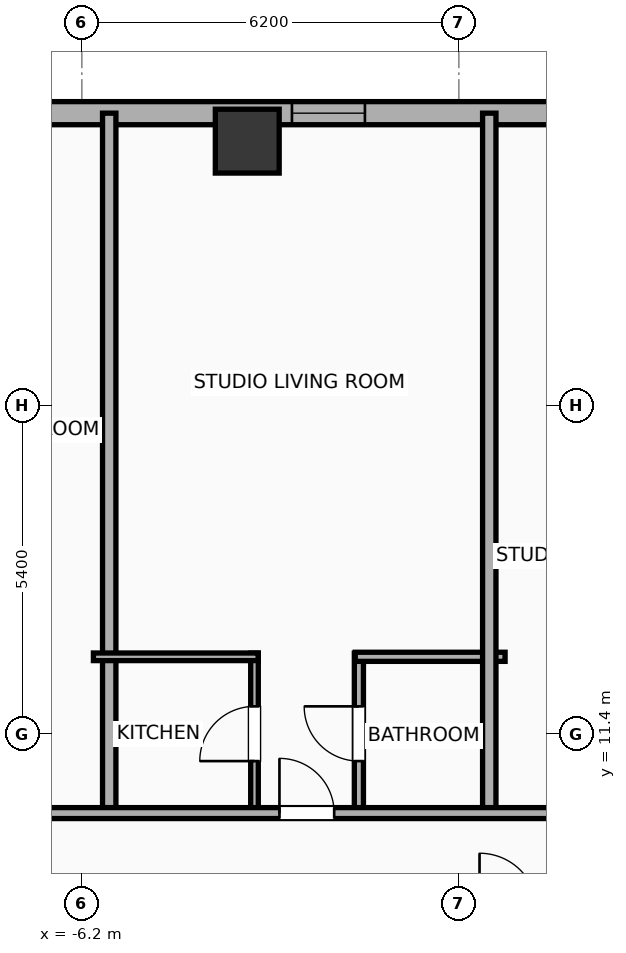
"""IFC4 building model, lengths in metres.
Left out: names, types, materials, properties, quantities, classifications, styles, units other than length and angle.
Written with IfcOpenShell. Run it as: python <this file> out.ifc"""

import sys

from ifc_helpers import new_model, si_unit, direction, frame, frame_2d, origin, origin_2d, place, context, subcontext, project, spatial, rectangle, hollow_rectangle, extrude, element, fill, save


model = new_model("IFC4")
c1 = context("Model", 3, precision=1e-05, world=origin(), true_north=direction((0.0, 1.0)))
c2 = subcontext(c1, "Body", "Model", "MODEL_VIEW")
j1 = project(units=[si_unit("LENGTHUNIT", "METRE"), si_unit("PLANEANGLEUNIT", "RADIAN")], contexts=[c1])
p1 = place(None, origin())
s1 = spatial("IfcSite", under=j1, at=p1, CompositionType="ELEMENT")
p2 = place(p1, origin())
s2 = spatial("IfcBuilding", under=s1, at=p2, CompositionType="ELEMENT")
p3 = place(p2, frame((0.0, 0.0, 124.8)))
s3 = spatial("IfcBuildingStorey", under=s2, at=p3, CompositionType="ELEMENT", Elevation=124.8)
p4 = place(p3, frame((-3.48, 21.15, 0.0), z_axis=(0.0, 0.0, 1.0), x_axis=(1.0, 0.0, 0.0)))
e1 = element("IfcColumn", 1, at=p4, inside=s3, PredefinedType="COLUMN", context=c2, shape_type="SweptSolid", body=[
    extrude(hollow_rectangle(XDim=1.05, YDim=1.05, WallThickness=0.036, at=origin_2d()), origin(), (0.0, 0.0, 1.0), 3.9),
])
p5 = place(p3, frame((-25.381, 21.61, 0.0), z_axis=(0.0, 0.0, 1.0), x_axis=(1.0, 0.0, 0.0)))
e2 = element("IfcWall", 2, at=p5, inside=s3, PredefinedType="ELEMENTEDWALL", context=c2, shape_type="SweptSolid", body=[
    extrude(rectangle(XDim=54.763, YDim=0.38, at=frame_2d((27.381, 0.0))), origin(), (0.0, 0.0, 1.0), 3.65),
])
p6 = place(p5, frame((4.795, 0.0, 0.75)))
e3 = element("IfcOpeningElement", 3, at=p6, cuts=e2, PredefinedType="OPENING", context=c2, shape_type="SweptSolid", body=[
    extrude(rectangle(XDim=2.4, YDim=2.1, at=frame_2d((1.2, 1.05))), frame((0.0, 0.2, 0.0), z_axis=(0.0, -1.0, 0.0), x_axis=(1.0, 0.0, 0.0)), (0.0, 0.0, 1.0), 0.4),
])
p7 = place(p5, frame((45.867, 0.0, 0.75)))
e4 = element("IfcOpeningElement", 4, at=p7, cuts=e2, PredefinedType="OPENING", context=c2, shape_type="SweptSolid", body=[
    extrude(rectangle(XDim=2.4, YDim=2.1, at=frame_2d((1.2, 1.05))), frame((0.0, 0.2, 0.0), z_axis=(0.0, -1.0, 0.0), x_axis=(1.0, 0.0, 0.0)), (0.0, 0.0, 1.0), 0.4),
])
p8 = place(p5, frame((2.408, 0.0, 0.75)))
e5 = element("IfcOpeningElement", 5, at=p8, cuts=e2, PredefinedType="OPENING", context=c2, shape_type="SweptSolid", body=[
    extrude(rectangle(XDim=1.2, YDim=2.05, at=frame_2d((0.6, 1.025))), frame((0.0, 0.2, 0.0), z_axis=(0.0, -1.0, 0.0), x_axis=(1.0, 0.0, 0.0)), (0.0, 0.0, 1.0), 0.4),
])
p9 = place(p5, frame((8.952, 0.0, 0.75)))
e6 = element("IfcOpeningElement", 6, at=p9, cuts=e2, PredefinedType="OPENING", context=c2, shape_type="SweptSolid", body=[
    extrude(rectangle(XDim=1.2, YDim=2.05, at=frame_2d((0.6, 1.025))), frame((0.0, 0.2, 0.0), z_axis=(0.0, -1.0, 0.0), x_axis=(1.0, 0.0, 0.0)), (0.0, 0.0, 1.0), 0.4),
])
p10 = place(p5, frame((17.132, 0.0, 0.75)))
e7 = element("IfcOpeningElement", 7, at=p10, cuts=e2, PredefinedType="OPENING", context=c2, shape_type="SweptSolid", body=[
    extrude(rectangle(XDim=1.2, YDim=2.05, at=frame_2d((0.6, 1.025))), frame((0.0, 0.2, 0.0), z_axis=(0.0, -1.0, 0.0), x_axis=(1.0, 0.0, 0.0)), (0.0, 0.0, 1.0), 0.4),
])
p11 = place(p5, frame((14.007, 0.0, 0.75)))
e8 = element("IfcOpeningElement", 8, at=p11, cuts=e2, PredefinedType="OPENING", context=c2, shape_type="SweptSolid", body=[
    extrude(rectangle(XDim=1.2, YDim=2.05, at=frame_2d((0.6, 1.025))), frame((0.0, 0.2, 0.0), z_axis=(0.0, -1.0, 0.0), x_axis=(1.0, 0.0, 0.0)), (0.0, 0.0, 1.0), 0.4),
])
p12 = place(p5, frame((22.636, 0.0, 0.75)))
e9 = element("IfcOpeningElement", 9, at=p12, cuts=e2, PredefinedType="OPENING", context=c2, shape_type="SweptSolid", body=[
    extrude(rectangle(XDim=1.2, YDim=2.05, at=frame_2d((0.6, 1.025))), frame((0.0, 0.2, 0.0), z_axis=(0.0, -1.0, 0.0), x_axis=(1.0, 0.0, 0.0)), (0.0, 0.0, 1.0), 0.4),
])
p13 = place(p5, frame((27.129, 0.0, 0.75)))
e10 = element("IfcOpeningElement", 10, at=p13, cuts=e2, PredefinedType="OPENING", context=c2, shape_type="SweptSolid", body=[
    extrude(rectangle(XDim=1.2, YDim=2.05, at=frame_2d((0.6, 1.025))), frame((0.0, 0.2, 0.0), z_axis=(0.0, -1.0, 0.0), x_axis=(1.0, 0.0, 0.0)), (0.0, 0.0, 1.0), 0.4),
])
p14 = place(p5, frame((30.254, 0.0, 0.75)))
e11 = element("IfcOpeningElement", 11, at=p14, cuts=e2, PredefinedType="OPENING", context=c2, shape_type="SweptSolid", body=[
    extrude(rectangle(XDim=1.2, YDim=2.05, at=frame_2d((0.6, 1.025))), frame((0.0, 0.2, 0.0), z_axis=(0.0, -1.0, 0.0), x_axis=(1.0, 0.0, 0.0)), (0.0, 0.0, 1.0), 0.4),
])
p15 = place(p5, frame((33.603, 0.0, 0.75)))
e12 = element("IfcOpeningElement", 12, at=p15, cuts=e2, PredefinedType="OPENING", context=c2, shape_type="SweptSolid", body=[
    extrude(rectangle(XDim=1.2, YDim=2.05, at=frame_2d((0.6, 1.025))), frame((0.0, 0.2, 0.0), z_axis=(0.0, -1.0, 0.0), x_axis=(1.0, 0.0, 0.0)), (0.0, 0.0, 1.0), 0.4),
])
p16 = place(p5, frame((36.608, 0.0, 0.75)))
e13 = element("IfcOpeningElement", 13, at=p16, cuts=e2, PredefinedType="OPENING", context=c2, shape_type="SweptSolid", body=[
    extrude(rectangle(XDim=1.2, YDim=2.05, at=frame_2d((0.6, 1.025))), frame((0.0, 0.2, 0.0), z_axis=(0.0, -1.0, 0.0), x_axis=(1.0, 0.0, 0.0)), (0.0, 0.0, 1.0), 0.4),
])
p17 = place(p5, frame((39.446, 0.0, 0.75)))
e14 = element("IfcOpeningElement", 14, at=p17, cuts=e2, PredefinedType="OPENING", context=c2, shape_type="SweptSolid", body=[
    extrude(rectangle(XDim=1.2, YDim=2.05, at=frame_2d((0.6, 1.025))), frame((0.0, 0.2, 0.0), z_axis=(0.0, -1.0, 0.0), x_axis=(1.0, 0.0, 0.0)), (0.0, 0.0, 1.0), 0.4),
])
p18 = place(p5, frame((42.27, 0.0, 0.75)))
e15 = element("IfcOpeningElement", 15, at=p18, cuts=e2, PredefinedType="OPENING", context=c2, shape_type="SweptSolid", body=[
    extrude(rectangle(XDim=0.85, YDim=2.05, at=frame_2d((0.425, 1.025))), frame((0.0, 0.2, 0.0), z_axis=(0.0, -1.0, 0.0), x_axis=(1.0, 0.0, 0.0)), (0.0, 0.0, 1.0), 0.4),
])
p19 = place(p5, frame((49.554, 0.0, 0.75)))
e16 = element("IfcOpeningElement", 16, at=p19, cuts=e2, PredefinedType="OPENING", context=c2, shape_type="SweptSolid", body=[
    extrude(rectangle(XDim=1.2, YDim=2.05, at=frame_2d((0.6, 1.025))), frame((0.0, 0.2, 0.0), z_axis=(0.0, -1.0, 0.0), x_axis=(1.0, 0.0, 0.0)), (0.0, 0.0, 1.0), 0.4),
])
p20 = place(p5, frame((52.266, 0.0, 0.75)))
e17 = element("IfcOpeningElement", 17, at=p20, cuts=e2, PredefinedType="OPENING", context=c2, shape_type="SweptSolid", body=[
    extrude(rectangle(XDim=1.2, YDim=2.05, at=frame_2d((0.6, 1.025))), frame((0.0, 0.2, 0.0), z_axis=(0.0, -1.0, 0.0), x_axis=(1.0, 0.0, 0.0)), (0.0, 0.0, 1.0), 0.4),
])
p21 = place(p3, frame((-5.75, 10.02, 0.0), z_axis=(0.0, 0.0, 1.0), x_axis=(0.0, 1.0, 0.0)))
e18 = element("IfcWall", 18, at=p21, inside=s3, PredefinedType="PARTITIONING", context=c2, shape_type="SweptSolid", body=[
    extrude(rectangle(XDim=11.59, YDim=0.22, at=frame_2d((5.795, 0.0))), origin(), (0.0, 0.0, 1.0), 3.65),
])
p22 = place(p3, frame((-3.361, 10.08, 0.0), z_axis=(0.0, 0.0, 1.0), x_axis=(0.0, 1.0, 0.0)))
e19 = element("IfcWall", 19, at=p22, inside=s3, PredefinedType="PARTITIONING", context=c2, shape_type="SweptSolid", body=[
    extrude(rectangle(XDim=2.65, YDim=0.125, at=frame_2d((1.325, 0.0))), origin(), (0.0, 0.0, 1.0), 3.65),
])
p23 = place(p22, frame((0.875, 0.0, 0.0)))
e20 = element("IfcOpeningElement", 20, at=p23, cuts=e19, PredefinedType="OPENING", context=c2, shape_type="SweptSolid", body=[
    extrude(rectangle(XDim=0.9, YDim=2.05, at=frame_2d((0.45, 1.025))), frame((0.0, 0.073, 0.0), z_axis=(0.0, -1.0, 0.0), x_axis=(1.0, 0.0, 0.0)), (0.0, 0.0, 1.0), 0.145),
])
p24 = place(p3, frame((-1.644, 10.08, 0.0), z_axis=(0.0, 0.0, 1.0), x_axis=(0.0, 1.0, 0.0)))
e21 = element("IfcWall", 21, at=p24, inside=s3, PredefinedType="PLUMBINGWALL", context=c2, shape_type="SweptSolid", body=[
    extrude(rectangle(XDim=2.65, YDim=0.15, at=frame_2d((1.325, 0.0))), origin(), (0.0, 0.0, 1.0), 3.65),
])
p25 = place(p24, frame((0.875, 0.0, 0.0)))
e22 = element("IfcOpeningElement", 22, at=p25, cuts=e21, PredefinedType="OPENING", context=c2, shape_type="SweptSolid", body=[
    extrude(rectangle(XDim=0.9, YDim=2.05, at=frame_2d((0.45, 1.025))), frame((0.0, 0.085, 0.0), z_axis=(0.0, -1.0, 0.0), x_axis=(1.0, 0.0, 0.0)), (0.0, 0.0, 1.0), 0.17),
])
p26 = place(p3, frame((-6.01, 12.67, 0.0), z_axis=(0.0, 0.0, 1.0), x_axis=(1.0, 0.0, 0.0)))
e23 = element("IfcWall", 23, at=p26, inside=s3, PredefinedType="PARTITIONING", context=c2, shape_type="SweptSolid", body=[
    extrude(rectangle(XDim=2.709, YDim=0.125, at=frame_2d((1.354, 0.0))), origin(), (0.0, 0.0, 1.0), 3.65),
])
p27 = place(p3, frame((-1.704, 12.67, 0.0), z_axis=(0.0, 0.0, 1.0), x_axis=(1.0, 0.0, 0.0)))
e24 = element("IfcWall", 24, at=p27, inside=s3, PredefinedType="PLUMBINGWALL", context=c2, shape_type="SweptSolid", body=[
    extrude(rectangle(XDim=2.464, YDim=0.15, at=frame_2d((1.232, 0.0))), origin(), (0.0, 0.0, 1.0), 3.65),
])
p28 = place(p3, frame((0.5, 10.02, 0.0), z_axis=(0.0, 0.0, 1.0), x_axis=(0.0, 1.0, 0.0)))
e25 = element("IfcWall", 25, at=p28, inside=s3, PredefinedType="PARTITIONING", context=c2, shape_type="SweptSolid", body=[
    extrude(rectangle(XDim=11.59, YDim=0.22, at=frame_2d((5.795, 0.0))), origin(), (0.0, 0.0, 1.0), 3.65),
])
p29 = place(p3, frame((-29.21, 10.1, 0.0), z_axis=(0.0, 0.0, 1.0), x_axis=(1.0, 0.0, 0.0)))
e26 = element("IfcWall", 26, at=p29, inside=s3, PredefinedType="PARTITIONING", context=c2, shape_type="SweptSolid", body=[
    extrude(rectangle(XDim=62.42, YDim=0.18, at=frame_2d((31.21, 0.0))), origin(), (0.0, 0.0, 1.0), 3.65),
])
p30 = place(p29, frame((2.54, 0.0, 0.0)))
e27 = element("IfcOpeningElement", 27, at=p30, cuts=e26, PredefinedType="OPENING", context=c2, shape_type="SweptSolid", body=[
    extrude(rectangle(XDim=0.9, YDim=2.05, at=frame_2d((0.45, 1.025))), frame((0.0, 0.1, 0.0), z_axis=(0.0, -1.0, 0.0), x_axis=(1.0, 0.0, 0.0)), (0.0, 0.0, 1.0), 0.2),
])
p31 = place(p29, frame((9.1, 0.0, 0.0)))
e28 = element("IfcOpeningElement", 28, at=p31, cuts=e26, PredefinedType="OPENING", context=c2, shape_type="SweptSolid", body=[
    extrude(rectangle(XDim=1.15, YDim=2.05, at=frame_2d((0.575, 1.025))), frame((0.0, 0.1, 0.0), z_axis=(0.0, -1.0, 0.0), x_axis=(1.0, 0.0, 0.0)), (0.0, 0.0, 1.0), 0.2),
])
p32 = place(p29, frame((14.063, 0.0, 0.0)))
e29 = element("IfcOpeningElement", 29, at=p32, cuts=e26, PredefinedType="OPENING", context=c2, shape_type="SweptSolid", body=[
    extrude(rectangle(XDim=0.9, YDim=2.05, at=frame_2d((0.45, 1.025))), frame((0.0, 0.1, 0.0), z_axis=(0.0, -1.0, 0.0), x_axis=(1.0, 0.0, 0.0)), (0.0, 0.0, 1.0), 0.2),
])
p33 = place(p29, frame((20.954, 0.0, 0.0)))
e30 = element("IfcOpeningElement", 30, at=p33, cuts=e26, PredefinedType="OPENING", context=c2, shape_type="SweptSolid", body=[
    extrude(rectangle(XDim=1.15, YDim=2.05, at=frame_2d((0.575, 1.025))), frame((0.0, 0.1, 0.0), z_axis=(0.0, -1.0, 0.0), x_axis=(1.0, 0.0, 0.0)), (0.0, 0.0, 1.0), 0.2),
])
p34 = place(p29, frame((26.26, 0.0, 0.0)))
e31 = element("IfcOpeningElement", 31, at=p34, cuts=e26, PredefinedType="OPENING", context=c2, shape_type="SweptSolid", body=[
    extrude(rectangle(XDim=0.9, YDim=2.05, at=frame_2d((0.45, 1.025))), frame((0.0, 0.1, 0.0), z_axis=(0.0, -1.0, 0.0), x_axis=(1.0, 0.0, 0.0)), (0.0, 0.0, 1.0), 0.2),
])
p35 = place(p29, frame((31.01, 0.0, 0.0)))
e32 = element("IfcOpeningElement", 32, at=p35, cuts=e26, PredefinedType="OPENING", context=c2, shape_type="SweptSolid", body=[
    extrude(rectangle(XDim=1.15, YDim=2.05, at=frame_2d((0.575, 1.025))), frame((0.0, 0.1, 0.0), z_axis=(0.0, -1.0, 0.0), x_axis=(1.0, 0.0, 0.0)), (0.0, 0.0, 1.0), 0.2),
])
p36 = place(p29, frame((37.37, 0.0, 0.0)))
e33 = element("IfcOpeningElement", 33, at=p36, cuts=e26, PredefinedType="OPENING", context=c2, shape_type="SweptSolid", body=[
    extrude(rectangle(XDim=1.15, YDim=2.05, at=frame_2d((0.575, 1.025))), frame((0.0, 0.1, 0.0), z_axis=(0.0, -1.0, 0.0), x_axis=(1.0, 0.0, 0.0)), (0.0, 0.0, 1.0), 0.2),
])
p37 = place(p29, frame((45.298, 0.0, 0.0)))
e34 = element("IfcOpeningElement", 34, at=p37, cuts=e26, PredefinedType="OPENING", context=c2, shape_type="SweptSolid", body=[
    extrude(rectangle(XDim=0.9, YDim=2.05, at=frame_2d((0.45, 1.025))), frame((0.0, 0.1, 0.0), z_axis=(0.0, -1.0, 0.0), x_axis=(1.0, 0.0, 0.0)), (0.0, 0.0, 1.0), 0.2),
])
p38 = place(p29, frame((52.033, 0.0, 0.0)))
e35 = element("IfcOpeningElement", 35, at=p38, cuts=e26, PredefinedType="OPENING", context=c2, shape_type="SweptSolid", body=[
    extrude(rectangle(XDim=0.9, YDim=2.05, at=frame_2d((0.45, 1.025))), frame((0.0, 0.1, 0.0), z_axis=(0.0, -1.0, 0.0), x_axis=(1.0, 0.0, 0.0)), (0.0, 0.0, 1.0), 0.2),
])
p39 = place(p29, frame((58.805, 0.0, 0.0)))
e36 = element("IfcOpeningElement", 36, at=p39, cuts=e26, PredefinedType="OPENING", context=c2, shape_type="SweptSolid", body=[
    extrude(rectangle(XDim=0.9, YDim=2.05, at=frame_2d((0.45, 1.025))), frame((0.0, 0.1, 0.0), z_axis=(0.0, -1.0, 0.0), x_axis=(1.0, 0.0, 0.0)), (0.0, 0.0, 1.0), 0.2),
])
p40 = place(p12, origin())
e37 = element("IfcWindow", 37, at=p40, inside=s3, PartitioningType="SINGLE_PANEL", PredefinedType="WINDOW", context=c2, shape_type="SweptSolid", body=[
    extrude(rectangle(XDim=1.2, YDim=2.05, at=frame_2d((0.6, 1.025))), frame((0.0, 0.03, 0.0), z_axis=(0.0, -1.0, 0.0), x_axis=(1.0, 0.0, 0.0)), (0.0, 0.0, 1.0), 0.06),
])
fill(e9, e37)
p41 = place(p23, origin())
e38 = element("IfcDoor", 38, at=p41, inside=s3, OperationType="SINGLE_SWING_LEFT", PredefinedType="DOOR", context=c2, shape_type="SweptSolid", body=[
    extrude(rectangle(XDim=0.9, YDim=2.05, at=frame_2d((0.45, 1.025))), frame((0.0, 0.025, 0.0), z_axis=(0.0, -1.0, 0.0), x_axis=(1.0, 0.0, 0.0)), (0.0, 0.0, 1.0), 0.05),
])
fill(e20, e38)
p42 = place(p25, origin())
e39 = element("IfcDoor", 39, at=p42, inside=s3, OperationType="SINGLE_SWING_RIGHT", PredefinedType="DOOR", context=c2, shape_type="SweptSolid", body=[
    extrude(rectangle(XDim=0.9, YDim=2.05, at=frame_2d((0.45, 1.025))), frame((0.0, 0.025, 0.0), z_axis=(0.0, -1.0, 0.0), x_axis=(1.0, 0.0, 0.0)), (0.0, 0.0, 1.0), 0.05),
])
fill(e22, e39)
p43 = place(p34, origin())
e40 = element("IfcDoor", 40, at=p43, inside=s3, OperationType="SINGLE_SWING_LEFT", PredefinedType="DOOR", context=c2, shape_type="SweptSolid", body=[
    extrude(rectangle(XDim=0.9, YDim=2.05, at=frame_2d((0.45, 1.025))), frame((0.0, 0.025, 0.0), z_axis=(0.0, -1.0, 0.0), x_axis=(1.0, 0.0, 0.0)), (0.0, 0.0, 1.0), 0.05),
])
fill(e31, e40)
save(model, sys.argv[1])
